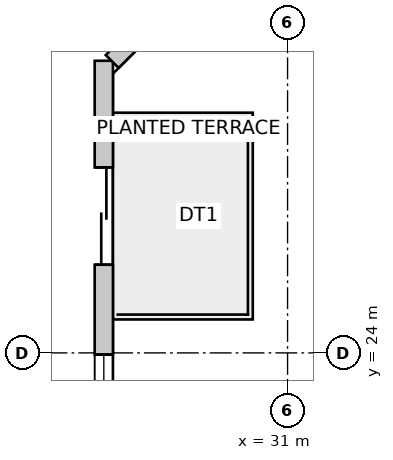
"""IFC4 building model, lengths in metres.
Left out: names, types, materials, properties, quantities, classifications, styles, units other than length and angle.
Written with IfcOpenShell. Run it as: python <this file> out.ifc"""

import sys

from ifc_helpers import new_model, si_unit, direction, frame, frame_2d, origin, place, context, subcontext, project, spatial, rectangle, extrude, source, transform, mapped, element, fill, save


model = new_model("IFC4")
c1 = context("Model", 3, precision=1e-05, world=origin(), true_north=direction((0.0, 1.0)))
c2 = subcontext(c1, "Body", "Model", "MODEL_VIEW")
j1 = project(units=[si_unit("LENGTHUNIT", "METRE"), si_unit("PLANEANGLEUNIT", "RADIAN")], contexts=[c1])
p1 = place(None, origin())
s1 = spatial("IfcSite", under=j1, at=p1, CompositionType="ELEMENT")
p2 = place(p1, origin())
s2 = spatial("IfcBuilding", under=s1, at=p2, CompositionType="ELEMENT")
p3 = place(p2, frame((0.0, 0.0, 146.6)))
s3 = spatial("IfcBuildingStorey", under=s2, at=p3, CompositionType="ELEMENT", Elevation=146.6)
p4 = place(p3, frame((27.978, 15.857, 0.0), z_axis=(0.0, 0.0, 1.0), x_axis=(0.0, 1.0, 0.0)))
e1 = element("IfcWall", 1, at=p4, inside=s3, PredefinedType="SOLIDWALL", context=c2, shape_type="SweptSolid", body=[
    extrude(rectangle(XDim=12.947, YDim=0.3, at=frame_2d((6.473, 0.0))), origin(), (0.0, 0.0, 1.0), 3.35),
])
m1 = source(origin(), c2, "Body", "SweptSolid", [
    extrude(rectangle(XDim=1.6, YDim=2.15, at=frame_2d((0.8, 1.075))), frame((0.0, 0.16, 0.0), z_axis=(0.0, -1.0, 0.0), x_axis=(1.0, 0.0, 0.0)), (0.0, 0.0, 1.0), 0.32),
])
p5 = place(p4, frame((9.593, 0.0, 0.0)))
e2 = element("IfcOpeningElement", 2, at=p5, cuts=e1, PredefinedType="OPENING", context=c2, shape_type="MappedRepresentation", body=[
    mapped(m1, transform((0.0, 0.0, 0.0), scale=1.0)),
])
m2 = source(origin(), c2, "Body", "SweptSolid", [
    extrude(rectangle(XDim=2.4, YDim=2.2, at=frame_2d((1.2, 1.1))), frame((0.0, 0.16, 0.0), z_axis=(0.0, -1.0, 0.0), x_axis=(1.0, 0.0, 0.0)), (0.0, 0.0, 1.0), 0.32),
])
p6 = place(p4, frame((1.368, 0.0, 0.85)))
e3 = element("IfcOpeningElement", 3, at=p6, cuts=e1, PredefinedType="OPENING", context=c2, shape_type="MappedRepresentation", body=[
    mapped(m2, transform((0.0, 0.0, 0.0), scale=1.0)),
])
m3 = source(origin(), c2, "Body", "SweptSolid", [
    extrude(rectangle(XDim=2.1, YDim=2.0, at=frame_2d((1.05, 1.0))), frame((0.0, 0.16, 0.0), z_axis=(0.0, -1.0, 0.0), x_axis=(1.0, 0.0, 0.0)), (0.0, 0.0, 1.0), 0.32),
])
p7 = place(p4, frame((6.015, 0.0, 0.85)))
e4 = element("IfcOpeningElement", 4, at=p7, cuts=e1, PredefinedType="OPENING", context=c2, shape_type="MappedRepresentation", body=[
    mapped(m3, transform((0.0, 0.0, 0.0), scale=1.0)),
])
p8 = place(p3, frame((28.116, 28.792, 0.0), z_axis=(0.0, 0.0, 1.0), x_axis=(0.707064797706, 0.707148762175, 0.0)))
e5 = element("IfcWall", 5, at=p8, inside=s3, PredefinedType="SOLIDWALL", context=c2, shape_type="SweptSolid", body=[
    extrude(rectangle(XDim=2.908, YDim=0.3, at=frame_2d((1.454, 0.0))), origin(), (0.0, 0.0, 1.0), 3.35),
])
m4 = source(origin(), c2, "Body", "SweptSolid", [
    extrude(rectangle(XDim=1.8, YDim=2.1, at=frame_2d((0.9, 1.05))), frame((0.0, 0.16, 0.0), z_axis=(0.0, -1.0, 0.0), x_axis=(1.0, 0.0, 0.0)), (0.0, 0.0, 1.0), 0.32),
])
p9 = place(p8, frame((0.554, 0.0, 0.85)))
e6 = element("IfcOpeningElement", 6, at=p9, cuts=e5, PredefinedType="OPENING", context=c2, shape_type="MappedRepresentation", body=[
    mapped(m4, transform((0.0, 0.0, 0.0), scale=1.0)),
])
m5 = source(origin(), c2, "Body", "SweptSolid", [
    extrude(rectangle(XDim=1.6, YDim=2.15, at=frame_2d((0.8, 1.075))), frame((0.0, 0.025, 0.0), z_axis=(0.0, -1.0, 0.0), x_axis=(1.0, 0.0, 0.0)), (0.0, 0.0, 1.0), 0.05),
])
p10 = place(p5, origin())
e7 = element("IfcDoor", 7, at=p10, inside=s3, OperationType="DOUBLE_DOOR_SLIDING", PredefinedType="DOOR", context=c2, shape_type="MappedRepresentation", body=[
    mapped(m5, transform((0.0, 0.0, 0.0), scale=1.0)),
])
fill(e2, e7)
m6 = source(origin(), c2, "Body", "SweptSolid", [
    extrude(rectangle(XDim=2.1, YDim=2.0, at=frame_2d((1.05, 1.0))), frame((0.0, -0.015, 0.0), z_axis=(0.0, -1.0, 0.0), x_axis=(1.0, 0.0, 0.0)), (0.0, 0.0, 1.0), 0.06),
])
p11 = place(p7, origin())
e8 = element("IfcWindow", 8, at=p11, inside=s3, PartitioningType="SINGLE_PANEL", PredefinedType="WINDOW", context=c2, shape_type="MappedRepresentation", body=[
    mapped(m6, transform((0.0, 0.0, 0.0), scale=1.0)),
])
fill(e4, e8)
save(model, sys.argv[1])
